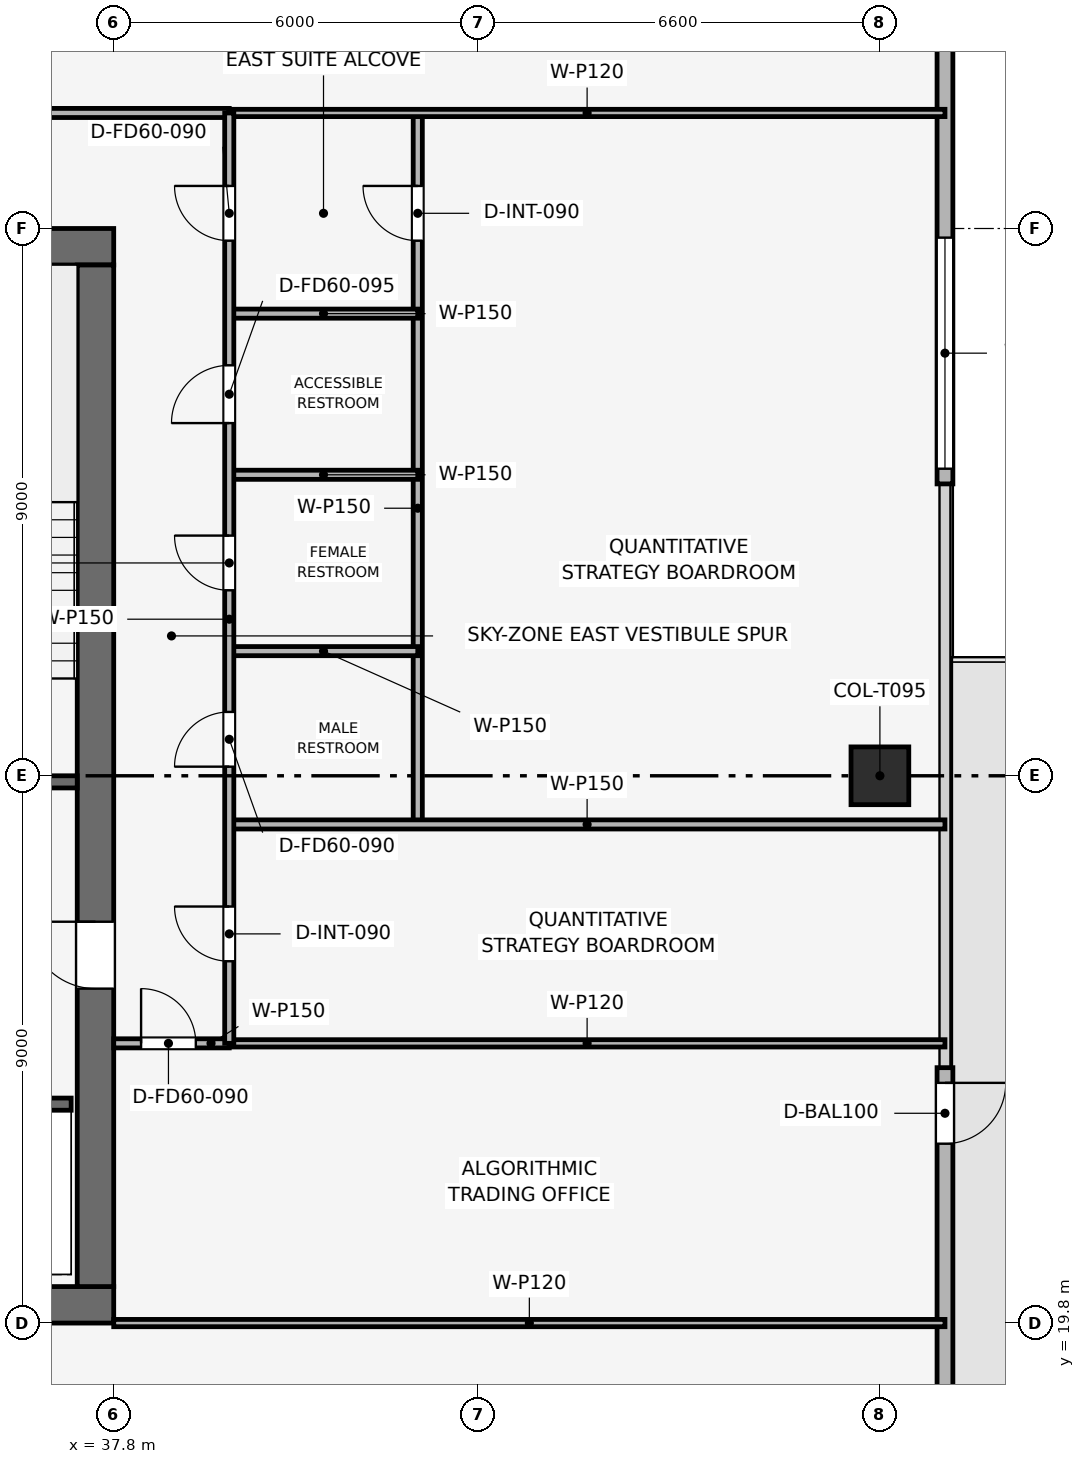
"""IFC4 building model, lengths in metres.
Left out: names, types, materials, properties, quantities, classifications, styles, units other than length and angle.
Written with IfcOpenShell. Run it as: python <this file> out.ifc"""

import sys

from ifc_helpers import new_model, si_unit, direction, frame, frame_2d, origin, origin_2d, place, context, subcontext, project, spatial, rectangle, extrude, element, fill, save


model = new_model("IFC4")
c1 = context("Model", 3, precision=1e-05, world=origin(), true_north=direction((0.0, 1.0)))
c2 = subcontext(c1, "Body", "Model", "MODEL_VIEW")
j1 = project(units=[si_unit("LENGTHUNIT", "METRE"), si_unit("PLANEANGLEUNIT", "RADIAN")], contexts=[c1])
p1 = place(None, origin())
s1 = spatial("IfcSite", under=j1, at=p1, CompositionType="ELEMENT")
p2 = place(p1, origin())
s2 = spatial("IfcBuilding", under=s1, at=p2, CompositionType="ELEMENT")
p3 = place(p2, frame((0.0, 0.0, 325.5)))
s3 = spatial("IfcBuildingStorey", under=s2, at=p3, CompositionType="ELEMENT", Elevation=325.5)
p4 = place(p3, frame((19.8, 20.1, 0.0), z_axis=(0.0, 0.0, 1.0), x_axis=(1.0, 0.0, 0.0)))
e1 = element("IfcWall", 1, at=p4, inside=s3, PredefinedType="SHEAR", context=c2, shape_type="SweptSolid", body=[
    extrude(rectangle(XDim=18.0, YDim=0.6, at=frame_2d((9.0, 0.0))), origin(), (0.0, 0.0, 1.0), 3.75),
])
p5 = place(p3, frame((19.8, 37.5, 0.0), z_axis=(0.0, 0.0, 1.0), x_axis=(1.0, 0.0, 0.0)))
e2 = element("IfcWall", 2, at=p5, inside=s3, PredefinedType="SHEAR", context=c2, shape_type="SweptSolid", body=[
    extrude(rectangle(XDim=18.0, YDim=0.6, at=frame_2d((9.0, 0.0))), origin(), (0.0, 0.0, 1.0), 3.75),
])
p6 = place(p5, frame((7.05, 0.0, 0.0)))
e3 = element("IfcOpeningElement", 3, at=p6, cuts=e2, PredefinedType="OPENING", context=c2, shape_type="SweptSolid", body=[
    extrude(rectangle(XDim=1.1, YDim=2.15, at=frame_2d((0.55, 1.075))), frame((0.0, 0.31, 0.0), z_axis=(0.0, -1.0, 0.0), x_axis=(1.0, 0.0, 0.0)), (0.0, 0.0, 1.0), 0.62),
])
p7 = place(p3, frame((37.5, 20.4, 0.0), z_axis=(0.0, 0.0, 1.0), x_axis=(0.0, 1.0, 0.0)))
e4 = element("IfcWall", 4, at=p7, inside=s3, PredefinedType="SHEAR", context=c2, shape_type="SweptSolid", body=[
    extrude(rectangle(XDim=16.8, YDim=0.6, at=frame_2d((8.4, 0.0))), origin(), (0.0, 0.0, 1.0), 3.75),
])
p8 = place(p7, frame((4.9, 0.0, 0.0)))
e5 = element("IfcOpeningElement", 5, at=p8, cuts=e4, PredefinedType="OPENING", context=c2, shape_type="SweptSolid", body=[
    extrude(rectangle(XDim=1.1, YDim=2.15, at=frame_2d((0.55, 1.075))), frame((0.0, 0.31, 0.0), z_axis=(0.0, -1.0, 0.0), x_axis=(1.0, 0.0, 0.0)), (0.0, 0.0, 1.0), 0.62),
])
p9 = place(p3, frame((50.4, 28.8, 0.003), z_axis=(0.0, 0.0, 1.0), x_axis=(1.0, 0.0, 0.0)))
e6 = element("IfcColumn", 6, at=p9, inside=s3, PredefinedType="COLUMN", context=c2, shape_type="SweptSolid", body=[
    extrude(rectangle(XDim=0.95, YDim=0.95, at=origin_2d()), origin(), (0.0, 0.0, 1.0), 3.504),
])
p10 = place(p3, frame((51.47, 45.3, 0.0), z_axis=(0.0, 0.0, 1.0), x_axis=(0.0, -1.0, 0.0)))
e7 = element("IfcWall", 7, at=p10, inside=s3, PredefinedType="SOLIDWALL", context=c2, shape_type="SweptSolid", body=[
    extrude(rectangle(XDim=11.7, YDim=0.26, at=frame_2d((5.85, 0.0))), origin(), (0.0, 0.0, 1.0), 3.51),
])
p11 = place(p10, frame((7.65, 0.0, 0.9)))
e8 = element("IfcOpeningElement", 8, at=p11, cuts=e7, PredefinedType="OPENING", context=c2, shape_type="SweptSolid", body=[
    extrude(rectangle(XDim=3.8, YDim=1.9, at=frame_2d((1.9, 0.95))), frame((0.0, 0.14, 0.0), z_axis=(0.0, -1.0, 0.0), x_axis=(1.0, 0.0, 0.0)), (0.0, 0.0, 1.0), 0.28),
])
p12 = place(p3, frame((51.47, 24.0, 0.0), z_axis=(0.0, 0.0, 1.0), x_axis=(0.0, -1.0, 0.0)))
e9 = element("IfcWall", 9, at=p12, inside=s3, PredefinedType="SOLIDWALL", context=c2, shape_type="SweptSolid", body=[
    extrude(rectangle(XDim=11.7, YDim=0.26, at=frame_2d((5.85, 0.0))), origin(), (0.0, 0.0, 1.0), 3.51),
])
p13 = place(p12, frame((0.25, 0.0, 0.0)))
e10 = element("IfcOpeningElement", 10, at=p13, cuts=e9, PredefinedType="OPENING", context=c2, shape_type="SweptSolid", body=[
    extrude(rectangle(XDim=1.0, YDim=2.2, at=frame_2d((0.5, 1.1))), frame((0.0, 0.14, 0.0), z_axis=(0.0, -1.0, 0.0), x_axis=(1.0, 0.0, 0.0)), (0.0, 0.0, 1.0), 0.28),
])
p14 = place(p3, frame((34.05, 28.7, 0.0), z_axis=(0.0, 0.0, 1.0), x_axis=(1.0, 0.0, 0.0)))
e11 = element("IfcWall", 11, at=p14, inside=s3, PredefinedType="SHEAR", context=c2, shape_type="SweptSolid", body=[
    extrude(rectangle(XDim=3.15, YDim=0.2, at=frame_2d((1.575, 0.0))), origin(), (0.0, 0.0, 1.0), 3.51),
])
p15 = place(p14, frame((0.8, 0.0, 0.0)))
e12 = element("IfcOpeningElement", 12, at=p15, cuts=e11, PredefinedType="OPENING", context=c2, shape_type="SweptSolid", body=[
    extrude(rectangle(XDim=1.0, YDim=2.1, at=frame_2d((0.5, 1.05))), frame((0.0, 0.11, 0.0), z_axis=(0.0, -1.0, 0.0), x_axis=(1.0, 0.0, 0.0)), (0.0, 0.0, 1.0), 0.22),
])
p16 = place(p3, frame((34.05, 23.4, 0.0), z_axis=(0.0, 0.0, 1.0), x_axis=(1.0, 0.0, 0.0)))
e13 = element("IfcWall", 13, at=p16, inside=s3, PredefinedType="SHEAR", context=c2, shape_type="SweptSolid", body=[
    extrude(rectangle(XDim=3.05, YDim=0.2, at=frame_2d((1.525, 0.0))), origin(), (0.0, 0.0, 1.0), 3.51),
])
p17 = place(p16, frame((1.2, 0.0, 0.0)))
e14 = element("IfcOpeningElement", 14, at=p17, cuts=e13, PredefinedType="OPENING", context=c2, shape_type="SweptSolid", body=[
    extrude(rectangle(XDim=1.1, YDim=2.15, at=frame_2d((0.55, 1.075))), frame((0.0, 0.11, 0.0), z_axis=(0.0, -1.0, 0.0), x_axis=(1.0, 0.0, 0.0)), (0.0, 0.0, 1.0), 0.22),
])
p18 = place(p3, frame((37.8, 19.8, 0.0), z_axis=(0.0, 0.0, 1.0), x_axis=(1.0, 0.0, 0.0)))
e15 = element("IfcWall", 15, at=p18, inside=s3, PredefinedType="PARTITIONING", context=c2, shape_type="SweptSolid", body=[
    extrude(rectangle(XDim=13.67, YDim=0.12, at=frame_2d((6.835, 0.0))), origin(), (0.0, 0.0, 1.0), 3.095),
])
p19 = place(p3, frame((37.8, 24.4, 0.0), z_axis=(0.0, 0.0, 1.0), x_axis=(1.0, 0.0, 0.0)))
e16 = element("IfcWall", 16, at=p19, inside=s3, PredefinedType="PARTITIONING", context=c2, shape_type="SweptSolid", body=[
    extrude(rectangle(XDim=1.9, YDim=0.15, at=frame_2d((0.95, 0.0))), origin(), (0.0, 0.0, 1.0), 3.51),
])
p20 = place(p19, frame((0.45, 0.0, 0.0)))
e17 = element("IfcOpeningElement", 17, at=p20, cuts=e16, PredefinedType="OPENING", context=c2, shape_type="SweptSolid", body=[
    extrude(rectangle(XDim=0.9, YDim=2.1, at=frame_2d((0.45, 1.05))), frame((0.0, 0.085, 0.0), z_axis=(0.0, -1.0, 0.0), x_axis=(1.0, 0.0, 0.0)), (0.0, 0.0, 1.0), 0.17),
])
p21 = place(p3, frame((39.7, 24.4, 0.0), z_axis=(0.0, 0.0, 1.0), x_axis=(1.0, 0.0, 0.0)))
e18 = element("IfcWall", 18, at=p21, inside=s3, PredefinedType="PARTITIONING", context=c2, shape_type="SweptSolid", body=[
    extrude(rectangle(XDim=11.77, YDim=0.12, at=frame_2d((5.885, 0.0))), origin(), (0.0, 0.0, 1.0), 3.135),
])
p22 = place(p3, frame((42.8, 28.0, 0.0), z_axis=(0.0, 0.0, 1.0), x_axis=(0.0, 1.0, 0.0)))
e19 = element("IfcWall", 19, at=p22, inside=s3, PredefinedType="PARTITIONING", context=c2, shape_type="SweptSolid", body=[
    extrude(rectangle(XDim=11.7, YDim=0.15, at=frame_2d((5.85, 0.0))), origin(), (0.0, 0.0, 1.0), 3.095),
])
p23 = place(p22, frame((9.6, 0.0, 0.0)))
e20 = element("IfcOpeningElement", 20, at=p23, cuts=e19, PredefinedType="OPENING", context=c2, shape_type="SweptSolid", body=[
    extrude(rectangle(XDim=0.9, YDim=2.1, at=frame_2d((0.45, 1.05))), frame((0.0, 0.085, 0.0), z_axis=(0.0, -1.0, 0.0), x_axis=(1.0, 0.0, 0.0)), (0.0, 0.0, 1.0), 0.17),
])
p24 = place(p3, frame((39.7, 28.0, 0.0), z_axis=(0.0, 0.0, 1.0), x_axis=(1.0, 0.0, 0.0)))
e21 = element("IfcWall", 21, at=p24, inside=s3, PredefinedType="PARTITIONING", context=c2, shape_type="SweptSolid", body=[
    extrude(rectangle(XDim=11.77, YDim=0.15, at=frame_2d((5.885, 0.0))), origin(), (0.0, 0.0, 1.0), 3.135),
])
for number, where, z_axis, x_axis in (
    (22, (39.7, 36.4, 0.0), (0.0, 0.0, 1.0), (1.0, 0.0, 0.0)),
    (23, (39.7, 30.85, 0.0), (0.0, 0.0, 1.0), (1.0, 0.0, 0.0)),
    (24, (39.7, 33.75, 0.0), (0.0, 0.0, 1.0), (1.0, 0.0, 0.0)),
):
    element("IfcWall", number, at=place(p3, frame(where, z_axis=z_axis, x_axis=x_axis)), inside=s3, PredefinedType="PARTITIONING", context=c2, shape_type="SweptSolid", body=[
        extrude(rectangle(XDim=3.1, YDim=0.15, at=frame_2d((1.55, 0.0))), origin(), (0.0, 0.0, 1.0), 3.135),
    ])
p25 = place(p3, frame((39.7, 39.7, 0.0), z_axis=(0.0, 0.0, 1.0), x_axis=(1.0, 0.0, 0.0)))
e25 = element("IfcWall", 25, at=p25, inside=s3, PredefinedType="PARTITIONING", context=c2, shape_type="SweptSolid", body=[
    extrude(rectangle(XDim=11.77, YDim=0.12, at=frame_2d((5.885, 0.0))), origin(), (0.0, 0.0, 1.0), 3.095),
])
p26 = place(p3, frame((17.9, 39.7, 0.0), z_axis=(0.0, 0.0, 1.0), x_axis=(1.0, 0.0, 0.0)))
e26 = element("IfcWall", 26, at=p26, inside=s3, PredefinedType="PARTITIONING", context=c2, shape_type="SweptSolid", body=[
    extrude(rectangle(XDim=21.8, YDim=0.15, at=frame_2d((10.9, 0.0))), origin(), (0.0, 0.0, 1.0), 3.095),
])
p27 = place(p26, frame((10.45, 0.0, 0.0)))
e27 = element("IfcOpeningElement", 27, at=p27, cuts=e26, PredefinedType="OPENING", context=c2, shape_type="SweptSolid", body=[
    extrude(rectangle(XDim=0.9, YDim=2.1, at=frame_2d((0.45, 1.05))), frame((0.0, 0.085, 0.0), z_axis=(0.0, -1.0, 0.0), x_axis=(1.0, 0.0, 0.0)), (0.0, 0.0, 1.0), 0.17),
])
p28 = place(p3, frame((39.7, 24.4, 0.0), z_axis=(0.0, 0.0, 1.0), x_axis=(0.0, 1.0, 0.0)))
e28 = element("IfcWall", 28, at=p28, inside=s3, PredefinedType="PARTITIONING", context=c2, shape_type="SweptSolid", body=[
    extrude(rectangle(XDim=15.3, YDim=0.15, at=frame_2d((7.65, 0.0))), origin(), (0.0, 0.0, 1.0), 3.095),
])
p29 = place(p28, frame((1.35, 0.0, 0.0)))
e29 = element("IfcOpeningElement", 29, at=p29, cuts=e28, PredefinedType="OPENING", context=c2, shape_type="SweptSolid", body=[
    extrude(rectangle(XDim=0.9, YDim=2.1, at=frame_2d((0.45, 1.05))), frame((0.0, 0.085, 0.0), z_axis=(0.0, -1.0, 0.0), x_axis=(1.0, 0.0, 0.0)), (0.0, 0.0, 1.0), 0.17),
])
p30 = place(p28, frame((4.55, 0.0, 0.0)))
e30 = element("IfcOpeningElement", 30, at=p30, cuts=e28, PredefinedType="OPENING", context=c2, shape_type="SweptSolid", body=[
    extrude(rectangle(XDim=0.9, YDim=2.1, at=frame_2d((0.45, 1.05))), frame((0.0, 0.085, 0.0), z_axis=(0.0, -1.0, 0.0), x_axis=(1.0, 0.0, 0.0)), (0.0, 0.0, 1.0), 0.17),
])
p31 = place(p28, frame((7.45, 0.0, 0.0)))
e31 = element("IfcOpeningElement", 31, at=p31, cuts=e28, PredefinedType="OPENING", context=c2, shape_type="SweptSolid", body=[
    extrude(rectangle(XDim=0.9, YDim=2.1, at=frame_2d((0.45, 1.05))), frame((0.0, 0.085, 0.0), z_axis=(0.0, -1.0, 0.0), x_axis=(1.0, 0.0, 0.0)), (0.0, 0.0, 1.0), 0.17),
])
p32 = place(p28, frame((10.2, 0.0, 0.0)))
e32 = element("IfcOpeningElement", 32, at=p32, cuts=e28, PredefinedType="OPENING", context=c2, shape_type="SweptSolid", body=[
    extrude(rectangle(XDim=0.95, YDim=2.1, at=frame_2d((0.475, 1.05))), frame((0.0, 0.085, 0.0), z_axis=(0.0, -1.0, 0.0), x_axis=(1.0, 0.0, 0.0)), (0.0, 0.0, 1.0), 0.17),
])
p33 = place(p28, frame((13.2, 0.0, 0.0)))
e33 = element("IfcOpeningElement", 33, at=p33, cuts=e28, PredefinedType="OPENING", context=c2, shape_type="SweptSolid", body=[
    extrude(rectangle(XDim=0.9, YDim=2.1, at=frame_2d((0.45, 1.05))), frame((0.0, 0.085, 0.0), z_axis=(0.0, -1.0, 0.0), x_axis=(1.0, 0.0, 0.0)), (0.0, 0.0, 1.0), 0.17),
])
p34 = place(p13, origin())
e34 = element("IfcDoor", 34, at=p34, inside=s3, OperationType="SINGLE_SWING_LEFT", PredefinedType="DOOR", context=c2, shape_type="SweptSolid", body=[
    extrude(rectangle(XDim=1.0, YDim=2.2, at=frame_2d((0.5, 1.1))), frame((0.0, 0.025, 0.0), z_axis=(0.0, -1.0, 0.0), x_axis=(1.0, 0.0, 0.0)), (0.0, 0.0, 1.0), 0.05),
])
fill(e10, e34)
p35 = place(p11, origin())
e35 = element("IfcWindow", 35, at=p35, inside=s3, PartitioningType="SINGLE_PANEL", PredefinedType="WINDOW", context=c2, shape_type="SweptSolid", body=[
    extrude(rectangle(XDim=3.8, YDim=1.9, at=frame_2d((1.9, 0.95))), frame((0.0, 0.03, 0.0), z_axis=(0.0, -1.0, 0.0), x_axis=(1.0, 0.0, 0.0)), (0.0, 0.0, 1.0), 0.06),
])
fill(e8, e35)
p36 = place(p20, origin())
e36 = element("IfcDoor", 36, at=p36, inside=s3, OperationType="SINGLE_SWING_LEFT", PredefinedType="DOOR", context=c2, shape_type="SweptSolid", body=[
    extrude(rectangle(XDim=0.9, YDim=2.1, at=frame_2d((0.45, 1.05))), frame((0.0, 0.025, 0.0), z_axis=(0.0, -1.0, 0.0), x_axis=(1.0, 0.0, 0.0)), (0.0, 0.0, 1.0), 0.05),
])
fill(e17, e36)
p37 = place(p23, origin())
e37 = element("IfcDoor", 37, at=p37, inside=s3, OperationType="SINGLE_SWING_RIGHT", PredefinedType="DOOR", context=c2, shape_type="SweptSolid", body=[
    extrude(rectangle(XDim=0.9, YDim=2.1, at=frame_2d((0.45, 1.05))), frame((0.0, 0.025, 0.0), z_axis=(0.0, -1.0, 0.0), x_axis=(1.0, 0.0, 0.0)), (0.0, 0.0, 1.0), 0.05),
])
fill(e20, e37)
p38 = place(p29, origin())
e38 = element("IfcDoor", 38, at=p38, inside=s3, OperationType="SINGLE_SWING_RIGHT", PredefinedType="DOOR", context=c2, shape_type="SweptSolid", body=[
    extrude(rectangle(XDim=0.9, YDim=2.1, at=frame_2d((0.45, 1.05))), frame((0.0, 0.025, 0.0), z_axis=(0.0, -1.0, 0.0), x_axis=(1.0, 0.0, 0.0)), (0.0, 0.0, 1.0), 0.05),
])
fill(e29, e38)
p39 = place(p30, origin())
e39 = element("IfcDoor", 39, at=p39, inside=s3, OperationType="SINGLE_SWING_LEFT", PredefinedType="DOOR", context=c2, shape_type="SweptSolid", body=[
    extrude(rectangle(XDim=0.9, YDim=2.1, at=frame_2d((0.45, 1.05))), frame((0.0, 0.025, 0.0), z_axis=(0.0, -1.0, 0.0), x_axis=(1.0, 0.0, 0.0)), (0.0, 0.0, 1.0), 0.05),
])
fill(e30, e39)
p40 = place(p31, origin())
e40 = element("IfcDoor", 40, at=p40, inside=s3, OperationType="SINGLE_SWING_RIGHT", PredefinedType="DOOR", context=c2, shape_type="SweptSolid", body=[
    extrude(rectangle(XDim=0.9, YDim=2.1, at=frame_2d((0.45, 1.05))), frame((0.0, 0.025, 0.0), z_axis=(0.0, -1.0, 0.0), x_axis=(1.0, 0.0, 0.0)), (0.0, 0.0, 1.0), 0.05),
])
fill(e31, e40)
p41 = place(p32, origin())
e41 = element("IfcDoor", 41, at=p41, inside=s3, OperationType="SINGLE_SWING_LEFT", PredefinedType="DOOR", context=c2, shape_type="SweptSolid", body=[
    extrude(rectangle(XDim=0.95, YDim=2.1, at=frame_2d((0.475, 1.05))), frame((0.0, 0.025, 0.0), z_axis=(0.0, -1.0, 0.0), x_axis=(1.0, 0.0, 0.0)), (0.0, 0.0, 1.0), 0.05),
])
fill(e32, e41)
p42 = place(p33, origin())
e42 = element("IfcDoor", 42, at=p42, inside=s3, OperationType="SINGLE_SWING_RIGHT", PredefinedType="DOOR", context=c2, shape_type="SweptSolid", body=[
    extrude(rectangle(XDim=0.9, YDim=2.1, at=frame_2d((0.45, 1.05))), frame((0.0, 0.025, 0.0), z_axis=(0.0, -1.0, 0.0), x_axis=(1.0, 0.0, 0.0)), (0.0, 0.0, 1.0), 0.05),
])
fill(e33, e42)
p43 = place(p8, origin())
e43 = element("IfcDoor", 43, at=p43, inside=s3, OperationType="SINGLE_SWING_RIGHT", PredefinedType="DOOR", context=c2, shape_type="SweptSolid", body=[
    extrude(rectangle(XDim=1.1, YDim=2.15, at=frame_2d((0.55, 1.075))), frame((0.0, 0.025, 0.0), z_axis=(0.0, -1.0, 0.0), x_axis=(1.0, 0.0, 0.0)), (0.0, 0.0, 1.0), 0.05),
])
fill(e5, e43)
save(model, sys.argv[1])
